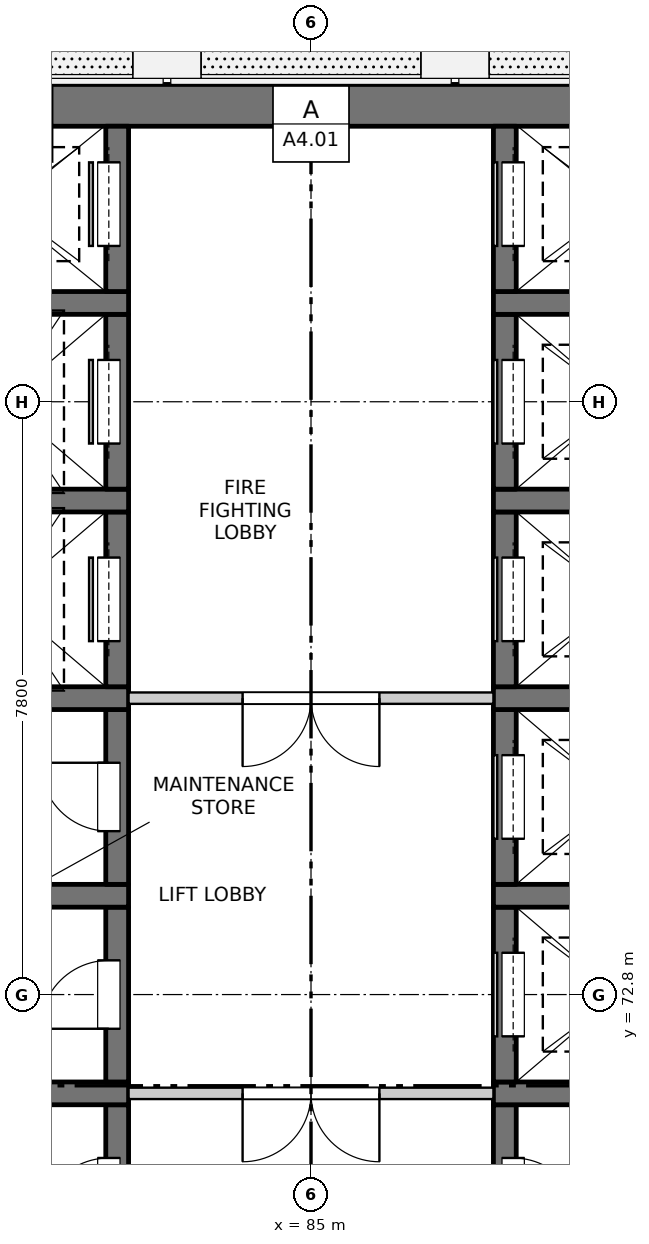
"""IFC4 building model, lengths in metres.
Left out: names, types, materials, properties, quantities, classifications, styles, units other than length and angle.
Written with IfcOpenShell. Run it as: python <this file> out.ifc"""

import sys

from ifc_helpers import new_model, si_unit, direction, frame, frame_2d, origin, place, context, subcontext, project, spatial, rectangle, extrude, element, fill, save


model = new_model("IFC4")
c1 = context("Model", 3, precision=1e-05, world=origin(), true_north=direction((0.0, 1.0)))
c2 = subcontext(c1, "Body", "Model", "MODEL_VIEW")
j1 = project(units=[si_unit("LENGTHUNIT", "METRE"), si_unit("PLANEANGLEUNIT", "RADIAN")], contexts=[c1])
p1 = place(None, origin())
s1 = spatial("IfcSite", under=j1, at=p1, CompositionType="ELEMENT")
p2 = place(p1, origin())
s2 = spatial("IfcBuilding", under=s1, at=p2, CompositionType="ELEMENT")
p3 = place(p2, frame((0.0, 0.0, 169.0)))
s3 = spatial("IfcBuildingStorey", under=s2, at=p3, CompositionType="ELEMENT", Elevation=169.0)
p4 = place(p3, frame((75.525, 84.5, -0.25), z_axis=(0.0, 0.0, 1.0), x_axis=(1.0, 0.0, 0.0)))
e1 = element("IfcWall", 1, at=p4, inside=s3, PredefinedType="SOLIDWALL", context=c2, shape_type="SweptSolid", body=[
    extrude(rectangle(XDim=18.95, YDim=0.55, at=frame_2d((9.475, 0.0))), origin(), (0.0, 0.0, 1.0), 3.35),
])
p5 = place(p3, frame((82.45, 69.05, -0.25), z_axis=(0.0, 0.0, 1.0), x_axis=(0.0, 1.0, 0.0)))
e2 = element("IfcWall", 2, at=p5, inside=s3, PredefinedType="SOLIDWALL", context=c2, shape_type="SweptSolid", body=[
    extrude(rectangle(XDim=2.3, YDim=0.3, at=frame_2d((1.15, 0.0))), origin(), (0.0, 0.0, 1.0), 3.35),
])
p6 = place(p5, frame((0.7, 0.0, 0.25)))
e3 = element("IfcOpeningElement", 3, at=p6, cuts=e2, PredefinedType="OPENING", context=c2, shape_type="SweptSolid", body=[
    extrude(rectangle(XDim=0.9, YDim=2.1, at=frame_2d((0.45, 1.05))), frame((0.0, 0.16, 0.0), z_axis=(0.0, -1.0, 0.0), x_axis=(1.0, 0.0, 0.0)), (0.0, 0.0, 1.0), 0.32),
])
p7 = place(p3, frame((79.6, 71.5, -0.25), z_axis=(0.0, 0.0, 1.0), x_axis=(1.0, 0.0, 0.0)))
e4 = element("IfcWall", 4, at=p7, inside=s3, PredefinedType="SOLIDWALL", context=c2, shape_type="SweptSolid", body=[
    extrude(rectangle(XDim=3.0, YDim=0.3, at=frame_2d((1.5, 0.0))), origin(), (0.0, 0.0, 1.0), 3.35),
])
p8 = place(p3, frame((82.45, 71.65, -0.25), z_axis=(0.0, 0.0, 1.0), x_axis=(0.0, 1.0, 0.0)))
e5 = element("IfcWall", 5, at=p8, inside=s3, PredefinedType="SOLIDWALL", context=c2, shape_type="SweptSolid", body=[
    extrude(rectangle(XDim=2.3, YDim=0.3, at=frame_2d((1.15, 0.0))), origin(), (0.0, 0.0, 1.0), 3.35),
])
p9 = place(p8, frame((0.7, 0.0, 0.25)))
e6 = element("IfcOpeningElement", 6, at=p9, cuts=e5, PredefinedType="OPENING", context=c2, shape_type="SweptSolid", body=[
    extrude(rectangle(XDim=0.9, YDim=2.1, at=frame_2d((0.45, 1.05))), frame((0.0, 0.16, 0.0), z_axis=(0.0, -1.0, 0.0), x_axis=(1.0, 0.0, 0.0)), (0.0, 0.0, 1.0), 0.32),
])
p10 = place(p3, frame((79.6, 74.1, -0.25), z_axis=(0.0, 0.0, 1.0), x_axis=(1.0, 0.0, 0.0)))
e7 = element("IfcWall", 7, at=p10, inside=s3, PredefinedType="SOLIDWALL", context=c2, shape_type="SweptSolid", body=[
    extrude(rectangle(XDim=3.0, YDim=0.3, at=frame_2d((1.5, 0.0))), origin(), (0.0, 0.0, 1.0), 3.35),
])
p11 = place(p3, frame((82.45, 74.25, -0.25), z_axis=(0.0, 0.0, 1.0), x_axis=(0.0, 1.0, 0.0)))
e8 = element("IfcWall", 8, at=p11, inside=s3, PredefinedType="SOLIDWALL", context=c2, shape_type="SweptSolid", body=[
    extrude(rectangle(XDim=2.3, YDim=0.3, at=frame_2d((1.15, 0.0))), origin(), (0.0, 0.0, 1.0), 3.35),
])
p12 = place(p11, frame((0.7, 0.0, 0.25)))
e9 = element("IfcOpeningElement", 9, at=p12, cuts=e8, PredefinedType="OPENING", context=c2, shape_type="SweptSolid", body=[
    extrude(rectangle(XDim=0.9, YDim=2.1, at=frame_2d((0.45, 1.05))), frame((0.0, 0.16, 0.0), z_axis=(0.0, -1.0, 0.0), x_axis=(1.0, 0.0, 0.0)), (0.0, 0.0, 1.0), 0.32),
])
p13 = place(p3, frame((79.6, 76.7, -0.25), z_axis=(0.0, 0.0, 1.0), x_axis=(1.0, 0.0, 0.0)))
e10 = element("IfcWall", 10, at=p13, inside=s3, PredefinedType="SOLIDWALL", context=c2, shape_type="SweptSolid", body=[
    extrude(rectangle(XDim=3.0, YDim=0.3, at=frame_2d((1.5, 0.0))), origin(), (0.0, 0.0, 1.0), 3.35),
])
p14 = place(p3, frame((82.45, 76.85, -0.25), z_axis=(0.0, 0.0, 1.0), x_axis=(0.0, 1.0, 0.0)))
e11 = element("IfcWall", 11, at=p14, inside=s3, PredefinedType="SOLIDWALL", context=c2, shape_type="SweptSolid", body=[
    extrude(rectangle(XDim=2.3, YDim=0.3, at=frame_2d((1.15, 0.0))), origin(), (0.0, 0.0, 1.0), 3.35),
])
p15 = place(p14, frame((0.6, 0.0, 0.25)))
e12 = element("IfcOpeningElement", 12, at=p15, cuts=e11, PredefinedType="OPENING", context=c2, shape_type="SweptSolid", body=[
    extrude(rectangle(XDim=1.1, YDim=2.1, at=frame_2d((0.55, 1.05))), frame((0.0, 0.16, 0.0), z_axis=(0.0, -1.0, 0.0), x_axis=(1.0, 0.0, 0.0)), (0.0, 0.0, 1.0), 0.32),
])
p16 = place(p3, frame((79.6, 79.3, -0.25), z_axis=(0.0, 0.0, 1.0), x_axis=(1.0, 0.0, 0.0)))
e13 = element("IfcWall", 13, at=p16, inside=s3, PredefinedType="SOLIDWALL", context=c2, shape_type="SweptSolid", body=[
    extrude(rectangle(XDim=3.0, YDim=0.3, at=frame_2d((1.5, 0.0))), origin(), (0.0, 0.0, 1.0), 3.35),
])
p17 = place(p3, frame((82.45, 79.45, -0.25), z_axis=(0.0, 0.0, 1.0), x_axis=(0.0, 1.0, 0.0)))
e14 = element("IfcWall", 14, at=p17, inside=s3, PredefinedType="SOLIDWALL", context=c2, shape_type="SweptSolid", body=[
    extrude(rectangle(XDim=2.3, YDim=0.3, at=frame_2d((1.15, 0.0))), origin(), (0.0, 0.0, 1.0), 3.35),
])
p18 = place(p17, frame((0.6, 0.0, 0.25)))
e15 = element("IfcOpeningElement", 15, at=p18, cuts=e14, PredefinedType="OPENING", context=c2, shape_type="SweptSolid", body=[
    extrude(rectangle(XDim=1.1, YDim=2.1, at=frame_2d((0.55, 1.05))), frame((0.0, 0.16, 0.0), z_axis=(0.0, -1.0, 0.0), x_axis=(1.0, 0.0, 0.0)), (0.0, 0.0, 1.0), 0.32),
])
p19 = place(p3, frame((79.6, 81.9, -0.25), z_axis=(0.0, 0.0, 1.0), x_axis=(1.0, 0.0, 0.0)))
e16 = element("IfcWall", 16, at=p19, inside=s3, PredefinedType="SOLIDWALL", context=c2, shape_type="SweptSolid", body=[
    extrude(rectangle(XDim=3.0, YDim=0.3, at=frame_2d((1.5, 0.0))), origin(), (0.0, 0.0, 1.0), 3.35),
])
p20 = place(p3, frame((82.45, 82.05, -0.25), z_axis=(0.0, 0.0, 1.0), x_axis=(0.0, 1.0, 0.0)))
e17 = element("IfcWall", 17, at=p20, inside=s3, PredefinedType="SOLIDWALL", context=c2, shape_type="SweptSolid", body=[
    extrude(rectangle(XDim=2.175, YDim=0.3, at=frame_2d((1.087, 0.0))), origin(), (0.0, 0.0, 1.0), 3.35),
])
p21 = place(p20, frame((0.6, 0.0, 0.25)))
e18 = element("IfcOpeningElement", 18, at=p21, cuts=e17, PredefinedType="OPENING", context=c2, shape_type="SweptSolid", body=[
    extrude(rectangle(XDim=1.1, YDim=2.1, at=frame_2d((0.55, 1.05))), frame((0.0, 0.16, 0.0), z_axis=(0.0, -1.0, 0.0), x_axis=(1.0, 0.0, 0.0)), (0.0, 0.0, 1.0), 0.32),
])
p22 = place(p3, frame((87.55, 69.05, -0.25), z_axis=(0.0, 0.0, 1.0), x_axis=(0.0, 1.0, 0.0)))
e19 = element("IfcWall", 19, at=p22, inside=s3, PredefinedType="SOLIDWALL", context=c2, shape_type="SweptSolid", body=[
    extrude(rectangle(XDim=2.3, YDim=0.3, at=frame_2d((1.15, 0.0))), origin(), (0.0, 0.0, 1.0), 3.35),
])
p23 = place(p22, frame((0.7, 0.0, 0.25)))
e20 = element("IfcOpeningElement", 20, at=p23, cuts=e19, PredefinedType="OPENING", context=c2, shape_type="SweptSolid", body=[
    extrude(rectangle(XDim=0.9, YDim=2.1, at=frame_2d((0.45, 1.05))), frame((0.0, 0.16, 0.0), z_axis=(0.0, -1.0, 0.0), x_axis=(1.0, 0.0, 0.0)), (0.0, 0.0, 1.0), 0.32),
])
p24 = place(p3, frame((87.4, 71.5, -0.25), z_axis=(0.0, 0.0, 1.0), x_axis=(1.0, 0.0, 0.0)))
e21 = element("IfcWall", 21, at=p24, inside=s3, PredefinedType="SOLIDWALL", context=c2, shape_type="SweptSolid", body=[
    extrude(rectangle(XDim=3.0, YDim=0.3, at=frame_2d((1.5, 0.0))), origin(), (0.0, 0.0, 1.0), 3.35),
])
p25 = place(p3, frame((87.55, 71.65, -0.25), z_axis=(0.0, 0.0, 1.0), x_axis=(0.0, 1.0, 0.0)))
e22 = element("IfcWall", 22, at=p25, inside=s3, PredefinedType="SOLIDWALL", context=c2, shape_type="SweptSolid", body=[
    extrude(rectangle(XDim=2.3, YDim=0.3, at=frame_2d((1.15, 0.0))), origin(), (0.0, 0.0, 1.0), 3.35),
])
p26 = place(p25, frame((0.6, 0.0, 0.25)))
e23 = element("IfcOpeningElement", 23, at=p26, cuts=e22, PredefinedType="OPENING", context=c2, shape_type="SweptSolid", body=[
    extrude(rectangle(XDim=1.1, YDim=2.1, at=frame_2d((0.55, 1.05))), frame((0.0, 0.16, 0.0), z_axis=(0.0, -1.0, 0.0), x_axis=(1.0, 0.0, 0.0)), (0.0, 0.0, 1.0), 0.32),
])
p27 = place(p3, frame((87.4, 74.1, -0.25), z_axis=(0.0, 0.0, 1.0), x_axis=(1.0, 0.0, 0.0)))
e24 = element("IfcWall", 24, at=p27, inside=s3, PredefinedType="SOLIDWALL", context=c2, shape_type="SweptSolid", body=[
    extrude(rectangle(XDim=3.0, YDim=0.3, at=frame_2d((1.5, 0.0))), origin(), (0.0, 0.0, 1.0), 3.35),
])
p28 = place(p3, frame((87.55, 74.25, -0.25), z_axis=(0.0, 0.0, 1.0), x_axis=(0.0, 1.0, 0.0)))
e25 = element("IfcWall", 25, at=p28, inside=s3, PredefinedType="SOLIDWALL", context=c2, shape_type="SweptSolid", body=[
    extrude(rectangle(XDim=2.3, YDim=0.3, at=frame_2d((1.15, 0.0))), origin(), (0.0, 0.0, 1.0), 3.35),
])
p29 = place(p28, frame((0.6, 0.0, 0.25)))
e26 = element("IfcOpeningElement", 26, at=p29, cuts=e25, PredefinedType="OPENING", context=c2, shape_type="SweptSolid", body=[
    extrude(rectangle(XDim=1.1, YDim=2.1, at=frame_2d((0.55, 1.05))), frame((0.0, 0.16, 0.0), z_axis=(0.0, -1.0, 0.0), x_axis=(1.0, 0.0, 0.0)), (0.0, 0.0, 1.0), 0.32),
])
p30 = place(p3, frame((87.4, 76.7, -0.25), z_axis=(0.0, 0.0, 1.0), x_axis=(1.0, 0.0, 0.0)))
e27 = element("IfcWall", 27, at=p30, inside=s3, PredefinedType="SOLIDWALL", context=c2, shape_type="SweptSolid", body=[
    extrude(rectangle(XDim=3.0, YDim=0.3, at=frame_2d((1.5, 0.0))), origin(), (0.0, 0.0, 1.0), 3.35),
])
p31 = place(p3, frame((87.55, 76.85, -0.25), z_axis=(0.0, 0.0, 1.0), x_axis=(0.0, 1.0, 0.0)))
e28 = element("IfcWall", 28, at=p31, inside=s3, PredefinedType="SOLIDWALL", context=c2, shape_type="SweptSolid", body=[
    extrude(rectangle(XDim=2.3, YDim=0.3, at=frame_2d((1.15, 0.0))), origin(), (0.0, 0.0, 1.0), 3.35),
])
p32 = place(p31, frame((0.6, 0.0, 0.25)))
e29 = element("IfcOpeningElement", 29, at=p32, cuts=e28, PredefinedType="OPENING", context=c2, shape_type="SweptSolid", body=[
    extrude(rectangle(XDim=1.1, YDim=2.1, at=frame_2d((0.55, 1.05))), frame((0.0, 0.16, 0.0), z_axis=(0.0, -1.0, 0.0), x_axis=(1.0, 0.0, 0.0)), (0.0, 0.0, 1.0), 0.32),
])
p33 = place(p3, frame((87.4, 79.3, -0.25), z_axis=(0.0, 0.0, 1.0), x_axis=(1.0, 0.0, 0.0)))
e30 = element("IfcWall", 30, at=p33, inside=s3, PredefinedType="SOLIDWALL", context=c2, shape_type="SweptSolid", body=[
    extrude(rectangle(XDim=3.0, YDim=0.3, at=frame_2d((1.5, 0.0))), origin(), (0.0, 0.0, 1.0), 3.35),
])
p34 = place(p3, frame((87.55, 79.45, -0.25), z_axis=(0.0, 0.0, 1.0), x_axis=(0.0, 1.0, 0.0)))
e31 = element("IfcWall", 31, at=p34, inside=s3, PredefinedType="SOLIDWALL", context=c2, shape_type="SweptSolid", body=[
    extrude(rectangle(XDim=2.3, YDim=0.3, at=frame_2d((1.15, 0.0))), origin(), (0.0, 0.0, 1.0), 3.35),
])
p35 = place(p34, frame((0.6, 0.0, 0.25)))
e32 = element("IfcOpeningElement", 32, at=p35, cuts=e31, PredefinedType="OPENING", context=c2, shape_type="SweptSolid", body=[
    extrude(rectangle(XDim=1.1, YDim=2.1, at=frame_2d((0.55, 1.05))), frame((0.0, 0.16, 0.0), z_axis=(0.0, -1.0, 0.0), x_axis=(1.0, 0.0, 0.0)), (0.0, 0.0, 1.0), 0.32),
])
p36 = place(p3, frame((87.4, 81.9, -0.25), z_axis=(0.0, 0.0, 1.0), x_axis=(1.0, 0.0, 0.0)))
e33 = element("IfcWall", 33, at=p36, inside=s3, PredefinedType="SOLIDWALL", context=c2, shape_type="SweptSolid", body=[
    extrude(rectangle(XDim=3.0, YDim=0.3, at=frame_2d((1.5, 0.0))), origin(), (0.0, 0.0, 1.0), 3.35),
])
p37 = place(p3, frame((87.55, 82.05, -0.25), z_axis=(0.0, 0.0, 1.0), x_axis=(0.0, 1.0, 0.0)))
e34 = element("IfcWall", 34, at=p37, inside=s3, PredefinedType="SOLIDWALL", context=c2, shape_type="SweptSolid", body=[
    extrude(rectangle(XDim=2.175, YDim=0.3, at=frame_2d((1.087, 0.0))), origin(), (0.0, 0.0, 1.0), 3.35),
])
p38 = place(p37, frame((0.6, 0.0, 0.25)))
e35 = element("IfcOpeningElement", 35, at=p38, cuts=e34, PredefinedType="OPENING", context=c2, shape_type="SweptSolid", body=[
    extrude(rectangle(XDim=1.1, YDim=2.1, at=frame_2d((0.55, 1.05))), frame((0.0, 0.16, 0.0), z_axis=(0.0, -1.0, 0.0), x_axis=(1.0, 0.0, 0.0)), (0.0, 0.0, 1.0), 0.32),
])
p39 = place(p3, frame((82.6, 71.5, 0.0), z_axis=(0.0, 0.0, 1.0), x_axis=(1.0, 0.0, 0.0)))
e36 = element("IfcWall", 36, at=p39, inside=s3, PredefinedType="PARTITIONING", context=c2, shape_type="SweptSolid", body=[
    extrude(rectangle(XDim=4.8, YDim=0.15, at=frame_2d((2.4, 0.0))), origin(), (0.0, 0.0, 1.0), 3.1),
])
p40 = place(p39, frame((1.5, 0.0, 0.0)))
e37 = element("IfcOpeningElement", 37, at=p40, cuts=e36, PredefinedType="OPENING", context=c2, shape_type="SweptSolid", body=[
    extrude(rectangle(XDim=1.8, YDim=2.1, at=frame_2d((0.9, 1.05))), frame((0.0, 0.085, 0.0), z_axis=(0.0, -1.0, 0.0), x_axis=(1.0, 0.0, 0.0)), (0.0, 0.0, 1.0), 0.17),
])
p41 = place(p3, frame((82.6, 76.7, 0.0), z_axis=(0.0, 0.0, 1.0), x_axis=(1.0, 0.0, 0.0)))
e38 = element("IfcWall", 38, at=p41, inside=s3, PredefinedType="PARTITIONING", context=c2, shape_type="SweptSolid", body=[
    extrude(rectangle(XDim=4.8, YDim=0.15, at=frame_2d((2.4, 0.0))), origin(), (0.0, 0.0, 1.0), 3.1),
])
p42 = place(p41, frame((1.5, 0.0, 0.0)))
e39 = element("IfcOpeningElement", 39, at=p42, cuts=e38, PredefinedType="OPENING", context=c2, shape_type="SweptSolid", body=[
    extrude(rectangle(XDim=1.8, YDim=2.1, at=frame_2d((0.9, 1.05))), frame((0.0, 0.085, 0.0), z_axis=(0.0, -1.0, 0.0), x_axis=(1.0, 0.0, 0.0)), (0.0, 0.0, 1.0), 0.17),
])
p43 = place(p6, origin())
e40 = element("IfcDoor", 40, at=p43, inside=s3, OperationType="SINGLE_SWING_LEFT", PredefinedType="DOOR", context=c2, shape_type="SweptSolid", body=[
    extrude(rectangle(XDim=0.9, YDim=2.1, at=frame_2d((0.45, 1.05))), frame((0.0, 0.135, 0.0), z_axis=(0.0, -1.0, 0.0), x_axis=(1.0, 0.0, 0.0)), (0.0, 0.0, 1.0), 0.05),
])
fill(e3, e40)
p44 = place(p23, origin())
e41 = element("IfcDoor", 41, at=p44, inside=s3, OperationType="SINGLE_SWING_RIGHT", PredefinedType="DOOR", context=c2, shape_type="SweptSolid", body=[
    extrude(rectangle(XDim=0.9, YDim=2.1, at=frame_2d((0.45, 1.05))), frame((0.0, -0.085, 0.0), z_axis=(0.0, -1.0, 0.0), x_axis=(1.0, 0.0, 0.0)), (0.0, 0.0, 1.0), 0.05),
])
fill(e20, e41)
p45 = place(p40, origin())
e42 = element("IfcDoor", 42, at=p45, inside=s3, OperationType="DOUBLE_DOOR_SINGLE_SWING", PredefinedType="DOOR", context=c2, shape_type="SweptSolid", body=[
    extrude(rectangle(XDim=1.8, YDim=2.1, at=frame_2d((0.9, 1.05))), frame((0.0, 0.025, 0.0), z_axis=(0.0, -1.0, 0.0), x_axis=(1.0, 0.0, 0.0)), (0.0, 0.0, 1.0), 0.05),
])
fill(e37, e42)
p46 = place(p9, origin())
e43 = element("IfcDoor", 43, at=p46, inside=s3, OperationType="SINGLE_SWING_LEFT", PredefinedType="DOOR", context=c2, shape_type="SweptSolid", body=[
    extrude(rectangle(XDim=0.9, YDim=2.1, at=frame_2d((0.45, 1.05))), frame((0.0, 0.135, 0.0), z_axis=(0.0, -1.0, 0.0), x_axis=(1.0, 0.0, 0.0)), (0.0, 0.0, 1.0), 0.05),
])
fill(e6, e43)
p47 = place(p26, origin())
e44 = element("IfcDoor", 44, at=p47, inside=s3, OperationType="SLIDING_TO_LEFT", PredefinedType="DOOR", context=c2, shape_type="SweptSolid", body=[
    extrude(rectangle(XDim=1.1, YDim=2.1, at=frame_2d((0.55, 1.05))), frame((0.0, -0.085, 0.0), z_axis=(0.0, -1.0, 0.0), x_axis=(1.0, 0.0, 0.0)), (0.0, 0.0, 1.0), 0.05),
])
fill(e23, e44)
p48 = place(p12, origin())
e45 = element("IfcDoor", 45, at=p48, inside=s3, OperationType="SINGLE_SWING_RIGHT", PredefinedType="DOOR", context=c2, shape_type="SweptSolid", body=[
    extrude(rectangle(XDim=0.9, YDim=2.1, at=frame_2d((0.45, 1.05))), frame((0.0, 0.135, 0.0), z_axis=(0.0, -1.0, 0.0), x_axis=(1.0, 0.0, 0.0)), (0.0, 0.0, 1.0), 0.05),
])
fill(e9, e45)
p49 = place(p29, origin())
e46 = element("IfcDoor", 46, at=p49, inside=s3, OperationType="SLIDING_TO_LEFT", PredefinedType="DOOR", context=c2, shape_type="SweptSolid", body=[
    extrude(rectangle(XDim=1.1, YDim=2.1, at=frame_2d((0.55, 1.05))), frame((0.0, -0.085, 0.0), z_axis=(0.0, -1.0, 0.0), x_axis=(1.0, 0.0, 0.0)), (0.0, 0.0, 1.0), 0.05),
])
fill(e26, e46)
p50 = place(p42, origin())
e47 = element("IfcDoor", 47, at=p50, inside=s3, OperationType="DOUBLE_DOOR_SINGLE_SWING", PredefinedType="DOOR", context=c2, shape_type="SweptSolid", body=[
    extrude(rectangle(XDim=1.8, YDim=2.1, at=frame_2d((0.9, 1.05))), frame((0.0, 0.025, 0.0), z_axis=(0.0, -1.0, 0.0), x_axis=(1.0, 0.0, 0.0)), (0.0, 0.0, 1.0), 0.05),
])
fill(e39, e47)
p51 = place(p15, origin())
e48 = element("IfcDoor", 48, at=p51, inside=s3, OperationType="SLIDING_TO_LEFT", PredefinedType="DOOR", context=c2, shape_type="SweptSolid", body=[
    extrude(rectangle(XDim=1.1, YDim=2.1, at=frame_2d((0.55, 1.05))), frame((0.0, 0.135, 0.0), z_axis=(0.0, -1.0, 0.0), x_axis=(1.0, 0.0, 0.0)), (0.0, 0.0, 1.0), 0.05),
])
fill(e12, e48)
p52 = place(p32, origin())
e49 = element("IfcDoor", 49, at=p52, inside=s3, OperationType="SLIDING_TO_LEFT", PredefinedType="DOOR", context=c2, shape_type="SweptSolid", body=[
    extrude(rectangle(XDim=1.1, YDim=2.1, at=frame_2d((0.55, 1.05))), frame((0.0, -0.085, 0.0), z_axis=(0.0, -1.0, 0.0), x_axis=(1.0, 0.0, 0.0)), (0.0, 0.0, 1.0), 0.05),
])
fill(e29, e49)
p53 = place(p18, origin())
e50 = element("IfcDoor", 50, at=p53, inside=s3, OperationType="SLIDING_TO_LEFT", PredefinedType="DOOR", context=c2, shape_type="SweptSolid", body=[
    extrude(rectangle(XDim=1.1, YDim=2.1, at=frame_2d((0.55, 1.05))), frame((0.0, 0.135, 0.0), z_axis=(0.0, -1.0, 0.0), x_axis=(1.0, 0.0, 0.0)), (0.0, 0.0, 1.0), 0.05),
])
fill(e15, e50)
p54 = place(p35, origin())
e51 = element("IfcDoor", 51, at=p54, inside=s3, OperationType="SLIDING_TO_RIGHT", PredefinedType="DOOR", context=c2, shape_type="SweptSolid", body=[
    extrude(rectangle(XDim=1.1, YDim=2.1, at=frame_2d((0.55, 1.05))), frame((0.0, -0.085, 0.0), z_axis=(0.0, -1.0, 0.0), x_axis=(1.0, 0.0, 0.0)), (0.0, 0.0, 1.0), 0.05),
])
fill(e32, e51)
p55 = place(p21, origin())
e52 = element("IfcDoor", 52, at=p55, inside=s3, OperationType="SLIDING_TO_RIGHT", PredefinedType="DOOR", context=c2, shape_type="SweptSolid", body=[
    extrude(rectangle(XDim=1.1, YDim=2.1, at=frame_2d((0.55, 1.05))), frame((0.0, 0.135, 0.0), z_axis=(0.0, -1.0, 0.0), x_axis=(1.0, 0.0, 0.0)), (0.0, 0.0, 1.0), 0.05),
])
fill(e18, e52)
p56 = place(p38, origin())
e53 = element("IfcDoor", 53, at=p56, inside=s3, OperationType="SLIDING_TO_RIGHT", PredefinedType="DOOR", context=c2, shape_type="SweptSolid", body=[
    extrude(rectangle(XDim=1.1, YDim=2.1, at=frame_2d((0.55, 1.05))), frame((0.0, -0.085, 0.0), z_axis=(0.0, -1.0, 0.0), x_axis=(1.0, 0.0, 0.0)), (0.0, 0.0, 1.0), 0.05),
])
fill(e35, e53)
save(model, sys.argv[1])
